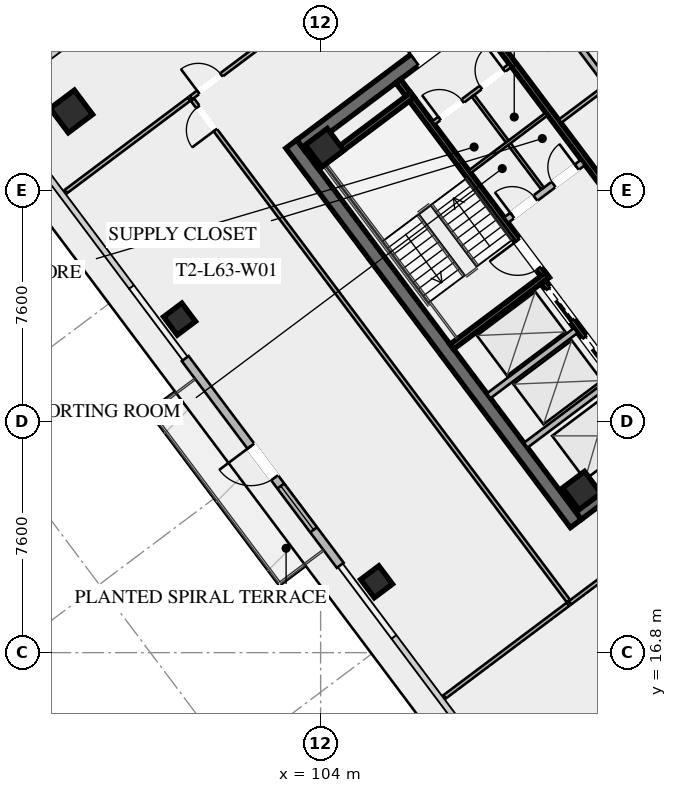
"""IFC4 building model, lengths in metres.
Left out: names, types, materials, properties, quantities, classifications, styles, units other than length and angle.
Written with IfcOpenShell. Run it as: python <this file> out.ifc"""

import sys

from ifc_helpers import new_model, si_unit, direction, frame, frame_2d, origin, origin_2d, place, context, subcontext, project, spatial, rectangle, hollow_rectangle, extrude, element, fill, save


model = new_model("IFC4")
c1 = context("Model", 3, precision=1e-05, world=origin(), true_north=direction((0.0, 1.0)))
c2 = subcontext(c1, "Body", "Model", "MODEL_VIEW")
j1 = project(units=[si_unit("LENGTHUNIT", "METRE"), si_unit("PLANEANGLEUNIT", "RADIAN")], contexts=[c1])
p1 = place(None, origin())
s1 = spatial("IfcSite", under=j1, at=p1, CompositionType="ELEMENT")
p2 = place(p1, origin())
s2 = spatial("IfcBuilding", under=s1, at=p2, CompositionType="ELEMENT")
p3 = place(p2, frame((0.0, 0.0, 232.6)))
s3 = spatial("IfcBuildingStorey", under=s2, at=p3, CompositionType="ELEMENT", Elevation=232.6)
p4 = place(p3, frame((112.396, 21.047, 0.0), z_axis=(0.0, 0.0, 1.0), x_axis=(-0.600005007985, 0.799996243986, 0.0)))
e1 = element("IfcWall", 1, at=p4, inside=s3, PredefinedType="SHEAR", context=c2, shape_type="SweptSolid", body=[
    extrude(rectangle(XDim=15.6, YDim=0.45, at=frame_2d((7.8, 0.0))), origin(), (0.0, 0.0, 1.0), 3.55),
])
p5 = place(p3, frame((124.649, 30.518, 0.0), z_axis=(0.0, 0.0, 1.0), x_axis=(-0.8, -0.6, 0.0)))
e2 = element("IfcWall", 2, at=p5, inside=s3, PredefinedType="SHEAR", context=c2, shape_type="SweptSolid", body=[
    extrude(rectangle(XDim=15.26, YDim=0.45, at=frame_2d((7.63, 0.0))), origin(), (0.0, 0.0, 1.0), 3.55),
])
p6 = place(p5, frame((9.33, 0.0, 0.0)))
e3 = element("IfcOpeningElement", 3, at=p6, cuts=e2, PredefinedType="OPENING", context=c2, shape_type="SweptSolid", body=[
    extrude(rectangle(XDim=1.25, YDim=2.25, at=frame_2d((0.625, 1.125))), frame((0.0, 0.235, 0.0), z_axis=(0.0, -1.0, 0.0), x_axis=(1.0, 0.0, 0.0)), (0.0, 0.0, 1.0), 0.47),
])
p7 = place(p5, frame((4.28, 0.0, 0.0)))
e4 = element("IfcOpeningElement", 4, at=p7, cuts=e2, PredefinedType="OPENING", context=c2, shape_type="SweptSolid", body=[
    extrude(rectangle(XDim=1.25, YDim=2.25, at=frame_2d((0.625, 1.125))), frame((0.0, 0.235, 0.0), z_axis=(0.0, -1.0, 0.0), x_axis=(1.0, 0.0, 0.0)), (0.0, 0.0, 1.0), 0.47),
])
p8 = place(p3, frame((103.351, 33.482, 0.0), z_axis=(0.0, 0.0, 1.0), x_axis=(0.8, 0.6, 0.0)))
e5 = element("IfcWall", 5, at=p8, inside=s3, PredefinedType="SHEAR", context=c2, shape_type="SweptSolid", body=[
    extrude(rectangle(XDim=15.26, YDim=0.45, at=frame_2d((7.63, 0.0))), origin(), (0.0, 0.0, 1.0), 3.55),
])
p9 = place(p8, frame((4.68, 0.0, 0.0)))
e6 = element("IfcOpeningElement", 6, at=p9, cuts=e5, PredefinedType="OPENING", context=c2, shape_type="SweptSolid", body=[
    extrude(rectangle(XDim=1.25, YDim=2.25, at=frame_2d((0.625, 1.125))), frame((0.0, 0.235, 0.0), z_axis=(0.0, -1.0, 0.0), x_axis=(1.0, 0.0, 0.0)), (0.0, 0.0, 1.0), 0.47),
])
p10 = place(p8, frame((9.73, 0.0, 0.0)))
e7 = element("IfcOpeningElement", 7, at=p10, cuts=e5, PredefinedType="OPENING", context=c2, shape_type="SweptSolid", body=[
    extrude(rectangle(XDim=1.25, YDim=2.25, at=frame_2d((0.625, 1.125))), frame((0.0, 0.235, 0.0), z_axis=(0.0, -1.0, 0.0), x_axis=(1.0, 0.0, 0.0)), (0.0, 0.0, 1.0), 0.47),
])
for number, where, z_axis, x_axis in (
    (8, (112.59, 22.13, 0.0), (0.0, 0.0, 1.0), (0.8, 0.6, 0.0)),
    (9, (104.13, 33.41, 0.0), (0.0, 0.0, 1.0), (0.8, 0.6, 0.0)),
):
    element("IfcColumn", number, at=place(p3, frame(where, z_axis=z_axis, x_axis=x_axis)), inside=s3, PredefinedType="COLUMN", context=c2, shape_type="SweptSolid", body=[
        extrude(hollow_rectangle(XDim=0.9, YDim=0.9, WallThickness=0.04, at=origin_2d()), origin(), (0.0, 0.0, 1.0), 3.37),
    ])
p11 = place(p3, frame((95.8, 34.6, -0.175), z_axis=(0.0, 0.0, 1.0), x_axis=(0.799999996291, 0.600000004945, 0.0)))
e10 = element("IfcColumn", 10, at=p11, inside=s3, PredefinedType="COLUMN", context=c2, shape_type="SweptSolid", body=[
    extrude(hollow_rectangle(XDim=1.0, YDim=1.0, WallThickness=0.04, at=origin_2d()), origin(), (0.0, 0.0, 1.0), 3.545),
])
for number, where, z_axis, x_axis in (
    (11, (99.36, 27.77, -0.175), (0.0, 0.0, 1.0), (0.8, 0.6, 0.0)),
    (12, (105.84, 19.13, -0.175), (0.0, 0.0, 1.0), (0.8, 0.6, 0.0)),
):
    element("IfcColumn", number, at=place(p3, frame(where, z_axis=z_axis, x_axis=x_axis)), inside=s3, PredefinedType="COLUMN", context=c2, shape_type="SweptSolid", body=[
        extrude(hollow_rectangle(XDim=0.75, YDim=0.75, WallThickness=0.032, at=origin_2d()), origin(), (0.0, 0.0, 1.0), 3.545),
    ])
p12 = place(p3, frame((104.646, 19.672, 0.0), z_axis=(0.0, 0.0, 1.0), x_axis=(-0.600018382406, 0.799986212866, 0.0)))
e13 = element("IfcWall", 13, at=p12, inside=s3, PredefinedType="SOLIDWALL", context=c2, shape_type="SweptSolid", body=[
    extrude(rectangle(XDim=8.5, YDim=0.28, at=frame_2d((4.25, 0.0))), origin(), (0.0, 0.0, 1.0), 3.37),
])
p13 = place(p12, frame((3.6, 0.0, 0.0)))
e14 = element("IfcOpeningElement", 14, at=p13, cuts=e13, PredefinedType="OPENING", context=c2, shape_type="SweptSolid", body=[
    extrude(rectangle(XDim=1.3, YDim=2.15, at=frame_2d((0.65, 1.075))), frame((0.0, 0.15, 0.0), z_axis=(0.0, -1.0, 0.0), x_axis=(1.0, 0.0, 0.0)), (0.0, 0.0, 1.0), 0.3),
])
p14 = place(p12, frame((1.46, 0.0, 0.85)))
e15 = element("IfcOpeningElement", 15, at=p14, cuts=e13, PredefinedType="OPENING", context=c2, shape_type="SweptSolid", body=[
    extrude(rectangle(XDim=1.8, YDim=1.92, at=frame_2d((0.9, 0.96))), frame((0.0, 0.15, 0.0), z_axis=(0.0, -1.0, 0.0), x_axis=(1.0, 0.0, 0.0)), (0.0, 0.0, 1.0), 0.3),
])
p15 = place(p3, frame((111.44, 29.08, 0.0), z_axis=(0.0, 0.0, 1.0), x_axis=(-0.59999041401, 0.800007189403, 0.0)))
e16 = element("IfcWall", 16, at=p15, inside=s3, PredefinedType="SHEAR", context=c2, shape_type="SweptSolid", body=[
    extrude(rectangle(XDim=8.15, YDim=0.2, at=frame_2d((4.075, 0.0))), origin(), (0.0, 0.0, 1.0), 3.37),
])
p16 = place(p15, frame((0.45, 0.0, 0.0)))
e17 = element("IfcOpeningElement", 17, at=p16, cuts=e16, PredefinedType="OPENING", context=c2, shape_type="SweptSolid", body=[
    extrude(rectangle(XDim=1.15, YDim=2.2, at=frame_2d((0.575, 1.1))), frame((0.0, 0.11, 0.0), z_axis=(0.0, -1.0, 0.0), x_axis=(1.0, 0.0, 0.0)), (0.0, 0.0, 1.0), 0.22),
])
for number, where, z_axis, x_axis in (
    (18, (108.316, 26.862, 0.0), (0.0, 0.0, 1.0), (0.8, 0.6, 0.0)),
    (19, (103.876, 32.782, 0.0), (0.0, 0.0, 1.0), (0.8, 0.6, 0.0)),
):
    element("IfcWall", number, at=place(p3, frame(where, z_axis=z_axis, x_axis=x_axis)), inside=s3, PredefinedType="SHEAR", context=c2, shape_type="SweptSolid", body=[
        extrude(rectangle(XDim=3.93, YDim=0.2, at=frame_2d((1.965, 0.0))), origin(), (0.0, 0.0, 1.0), 3.37),
    ])
p17 = place(p3, frame((118.058, 25.856, 0.0), z_axis=(0.0, 0.0, 1.0), x_axis=(-0.600002657301, 0.799998007018, 0.0)))
e20 = element("IfcWall", 20, at=p17, inside=s3, PredefinedType="SHEAR", context=c2, shape_type="SweptSolid", body=[
    extrude(rectangle(XDim=14.7, YDim=0.2, at=frame_2d((7.35, 0.0))), origin(), (0.0, 0.0, 1.0), 3.37),
])
p18 = place(p3, frame((110.104, 31.028, 0.0), z_axis=(0.0, 0.0, 1.0), x_axis=(0.800018601094, 0.59997519774, 0.0)))
e21 = element("IfcWall", 21, at=p18, inside=s3, PredefinedType="SOLIDWALL", context=c2, shape_type="SweptSolid", body=[
    extrude(rectangle(XDim=3.15, YDim=0.22, at=frame_2d((1.575, 0.0))), origin(), (0.0, 0.0, 1.0), 2.723),
])
p19 = place(p18, frame((0.25, 0.0, 0.0)))
e22 = element("IfcOpeningElement", 22, at=p19, cuts=e21, PredefinedType="OPENING", context=c2, shape_type="SweptSolid", body=[
    extrude(rectangle(XDim=0.95, YDim=2.05, at=frame_2d((0.475, 1.025))), frame((0.0, 0.12, 0.0), z_axis=(0.0, -1.0, 0.0), x_axis=(1.0, 0.0, 0.0)), (0.0, 0.0, 1.0), 0.24),
])
p20 = place(p18, frame((1.95, 0.0, 0.0)))
e23 = element("IfcOpeningElement", 23, at=p20, cuts=e21, PredefinedType="OPENING", context=c2, shape_type="SweptSolid", body=[
    extrude(rectangle(XDim=0.95, YDim=2.05, at=frame_2d((0.475, 1.025))), frame((0.0, 0.12, 0.0), z_axis=(0.0, -1.0, 0.0), x_axis=(1.0, 0.0, 0.0)), (0.0, 0.0, 1.0), 0.24),
])
p21 = place(p3, frame((115.25, 23.75, 0.0), z_axis=(0.0, 0.0, 1.0), x_axis=(-0.599994036198, 0.800004472816, 0.0)))
e24 = element("IfcWall", 24, at=p21, inside=s3, PredefinedType="SHEAR", context=c2, shape_type="SweptSolid", body=[
    extrude(rectangle(XDim=6.55, YDim=0.2, at=frame_2d((3.275, 0.0))), origin(), (0.0, 0.0, 1.0), 3.37),
])
p22 = place(p21, frame((4.975, 0.0, 0.0)))
e25 = element("IfcOpeningElement", 25, at=p22, cuts=e24, PredefinedType="OPENING", context=c2, shape_type="SweptSolid", body=[
    extrude(rectangle(XDim=1.3, YDim=2.25, at=frame_2d((0.65, 1.125))), frame((0.0, 0.11, 0.0), z_axis=(0.0, -1.0, 0.0), x_axis=(1.0, 0.0, 0.0)), (0.0, 0.0, 1.0), 0.22),
])
p23 = place(p21, frame((2.975, 0.0, 0.0)))
e26 = element("IfcOpeningElement", 26, at=p23, cuts=e24, PredefinedType="OPENING", context=c2, shape_type="SweptSolid", body=[
    extrude(rectangle(XDim=1.3, YDim=2.25, at=frame_2d((0.65, 1.125))), frame((0.0, 0.11, 0.0), z_axis=(0.0, -1.0, 0.0), x_axis=(1.0, 0.0, 0.0)), (0.0, 0.0, 1.0), 0.22),
])
p24 = place(p21, frame((0.775, 0.0, 0.0)))
e27 = element("IfcOpeningElement", 27, at=p24, cuts=e24, PredefinedType="OPENING", context=c2, shape_type="SweptSolid", body=[
    extrude(rectangle(XDim=1.3, YDim=2.25, at=frame_2d((0.65, 1.125))), frame((0.0, 0.11, 0.0), z_axis=(0.0, -1.0, 0.0), x_axis=(1.0, 0.0, 0.0)), (0.0, 0.0, 1.0), 0.22),
])
for number, where, z_axis, x_axis in (
    (28, (110.746, 23.622, 0.0), (0.0, 0.0, 1.0), (0.8, 0.6, 0.0)),
    (29, (109.528, 25.246, 0.0), (0.0, 0.0, 1.0), (0.8, 0.6, 0.0)),
):
    element("IfcWall", number, at=place(p3, frame(where, z_axis=z_axis, x_axis=x_axis)), inside=s3, PredefinedType="SOLIDWALL", context=c2, shape_type="SweptSolid", body=[
        extrude(rectangle(XDim=3.58, YDim=0.2, at=frame_2d((1.79, 0.0))), origin(), (0.0, 0.0, 1.0), 3.37),
    ])
p25 = place(p3, frame((112.75, 40.25, 0.0), z_axis=(0.0, 0.0, 1.0), x_axis=(0.599994036198, -0.800004472816, 0.0)))
e30 = element("IfcWall", 30, at=p25, inside=s3, PredefinedType="SHEAR", context=c2, shape_type="SweptSolid", body=[
    extrude(rectangle(XDim=6.55, YDim=0.2, at=frame_2d((3.275, 0.0))), origin(), (0.0, 0.0, 1.0), 3.37),
])
p26 = place(p25, frame((5.075, 0.0, 0.0)))
e31 = element("IfcOpeningElement", 31, at=p26, cuts=e30, PredefinedType="OPENING", context=c2, shape_type="SweptSolid", body=[
    extrude(rectangle(XDim=1.1, YDim=2.2, at=frame_2d((0.55, 1.1))), frame((0.0, 0.11, 0.0), z_axis=(0.0, -1.0, 0.0), x_axis=(1.0, 0.0, 0.0)), (0.0, 0.0, 1.0), 0.22),
])
p27 = place(p25, frame((3.025, 0.0, 0.0)))
e32 = element("IfcOpeningElement", 32, at=p27, cuts=e30, PredefinedType="OPENING", context=c2, shape_type="SweptSolid", body=[
    extrude(rectangle(XDim=1.1, YDim=2.2, at=frame_2d((0.55, 1.1))), frame((0.0, 0.11, 0.0), z_axis=(0.0, -1.0, 0.0), x_axis=(1.0, 0.0, 0.0)), (0.0, 0.0, 1.0), 0.22),
])
p28 = place(p25, frame((1.025, 0.0, 0.0)))
e33 = element("IfcOpeningElement", 33, at=p28, cuts=e30, PredefinedType="OPENING", context=c2, shape_type="SweptSolid", body=[
    extrude(rectangle(XDim=1.1, YDim=2.2, at=frame_2d((0.55, 1.1))), frame((0.0, 0.11, 0.0), z_axis=(0.0, -1.0, 0.0), x_axis=(1.0, 0.0, 0.0)), (0.0, 0.0, 1.0), 0.22),
])
p29 = place(p3, frame((107.71, 34.22, 0.0), z_axis=(0.0, 0.0, 1.0), x_axis=(0.799981399002, 0.60002480053, 0.0)))
e34 = element("IfcWall", 34, at=p29, inside=s3, PredefinedType="PARTITIONING", context=c2, shape_type="SweptSolid", body=[
    extrude(rectangle(XDim=3.15, YDim=0.135, at=frame_2d((1.575, 0.0))), origin(), (0.0, 0.0, 1.0), 2.723),
])
p30 = place(p29, frame((0.25, 0.0, 0.0)))
e35 = element("IfcOpeningElement", 35, at=p30, cuts=e34, PredefinedType="OPENING", context=c2, shape_type="SweptSolid", body=[
    extrude(rectangle(XDim=0.95, YDim=2.05, at=frame_2d((0.475, 1.025))), frame((0.0, 0.077, 0.0), z_axis=(0.0, -1.0, 0.0), x_axis=(1.0, 0.0, 0.0)), (0.0, 0.0, 1.0), 0.155),
])
p31 = place(p29, frame((1.95, 0.0, 0.0)))
e36 = element("IfcOpeningElement", 36, at=p31, cuts=e34, PredefinedType="OPENING", context=c2, shape_type="SweptSolid", body=[
    extrude(rectangle(XDim=0.95, YDim=2.05, at=frame_2d((0.475, 1.025))), frame((0.0, 0.077, 0.0), z_axis=(0.0, -1.0, 0.0), x_axis=(1.0, 0.0, 0.0)), (0.0, 0.0, 1.0), 0.155),
])
p32 = place(p3, frame((111.296, 32.072, 0.0), z_axis=(0.0, 0.0, 1.0), x_axis=(-0.59995887973, 0.800030838552, 0.0)))
e37 = element("IfcWall", 37, at=p32, inside=s3, PredefinedType="PARTITIONING", context=c2, shape_type="SweptSolid", body=[
    extrude(rectangle(XDim=3.8, YDim=0.11, at=frame_2d((1.9, 0.0))), origin(), (0.0, 0.0, 1.0), 2.723),
])
p33 = place(p3, frame((108.91, 32.62, 0.0), z_axis=(0.0, 0.0, 1.0), x_axis=(0.800018601094, 0.59997519774, 0.0)))
e38 = element("IfcWall", 38, at=p33, inside=s3, PredefinedType="PARTITIONING", context=c2, shape_type="SweptSolid", body=[
    extrude(rectangle(XDim=3.15, YDim=0.11, at=frame_2d((1.575, 0.0))), origin(), (0.0, 0.0, 1.0), 2.723),
])
p34 = place(p3, frame((115.11, 33.27, 0.0), z_axis=(0.0, 0.0, 1.0), x_axis=(-0.600011160345, 0.79999162962, 0.0)))
e39 = element("IfcWall", 39, at=p34, inside=s3, PredefinedType="SOLIDWALL", context=c2, shape_type="SweptSolid", body=[
    extrude(rectangle(XDim=7.0, YDim=0.2, at=frame_2d((3.5, 0.0))), origin(), (0.0, 0.0, 1.0), 2.723),
])
p35 = place(p34, frame((0.85, 0.0, 0.0)))
e40 = element("IfcOpeningElement", 40, at=p35, cuts=e39, PredefinedType="OPENING", context=c2, shape_type="SweptSolid", body=[
    extrude(rectangle(XDim=0.95, YDim=2.05, at=frame_2d((0.475, 1.025))), frame((0.0, 0.11, 0.0), z_axis=(0.0, -1.0, 0.0), x_axis=(1.0, 0.0, 0.0)), (0.0, 0.0, 1.0), 0.22),
])
p36 = place(p34, frame((4.85, 0.0, 0.0)))
e41 = element("IfcOpeningElement", 41, at=p36, cuts=e39, PredefinedType="OPENING", context=c2, shape_type="SweptSolid", body=[
    extrude(rectangle(XDim=0.95, YDim=2.05, at=frame_2d((0.475, 1.025))), frame((0.0, 0.11, 0.0), z_axis=(0.0, -1.0, 0.0), x_axis=(1.0, 0.0, 0.0)), (0.0, 0.0, 1.0), 0.22),
])
p37 = place(p3, frame((111.876, 34.282, 0.0), z_axis=(0.0, 0.0, 1.0), x_axis=(0.8, 0.6, 0.0)))
e42 = element("IfcWall", 42, at=p37, inside=s3, PredefinedType="PARTITIONING", context=c2, shape_type="SweptSolid", body=[
    extrude(rectangle(XDim=1.88, YDim=0.135, at=frame_2d((0.94, 0.0))), origin(), (0.0, 0.0, 1.0), 2.723),
])
p38 = place(p3, frame((99.736, 35.052, 0.0), z_axis=(0.0, 0.0, 1.0), x_axis=(0.799997387685, 0.600003483071, 0.0)))
e43 = element("IfcWall", 43, at=p38, inside=s3, PredefinedType="PARTITIONING", context=c2, shape_type="SweptSolid", body=[
    extrude(rectangle(XDim=22.43, YDim=0.135, at=frame_2d((11.215, 0.0))), origin(), (0.0, 0.0, 1.0), 2.723),
])
p39 = place(p38, frame((0.3, 0.0, 0.0)))
e44 = element("IfcOpeningElement", 44, at=p39, cuts=e43, PredefinedType="OPENING", context=c2, shape_type="SweptSolid", body=[
    extrude(rectangle(XDim=0.95, YDim=2.05, at=frame_2d((0.475, 1.025))), frame((0.0, 0.077, 0.0), z_axis=(0.0, -1.0, 0.0), x_axis=(1.0, 0.0, 0.0)), (0.0, 0.0, 1.0), 0.155),
])
p40 = place(p38, frame((9.423, 0.0, 0.0)))
e45 = element("IfcOpeningElement", 45, at=p40, cuts=e43, PredefinedType="OPENING", context=c2, shape_type="SweptSolid", body=[
    extrude(rectangle(XDim=0.95, YDim=2.05, at=frame_2d((0.475, 1.025))), frame((0.0, 0.077, 0.0), z_axis=(0.0, -1.0, 0.0), x_axis=(1.0, 0.0, 0.0)), (0.0, 0.0, 1.0), 0.155),
])
p41 = place(p38, frame((21.18, 0.0, 0.0)))
e46 = element("IfcOpeningElement", 46, at=p41, cuts=e43, PredefinedType="OPENING", context=c2, shape_type="SweptSolid", body=[
    extrude(rectangle(XDim=0.95, YDim=2.05, at=frame_2d((0.475, 1.025))), frame((0.0, 0.077, 0.0), z_axis=(0.0, -1.0, 0.0), x_axis=(1.0, 0.0, 0.0)), (0.0, 0.0, 1.0), 0.155),
])
p42 = place(p3, frame((123.382, 26.824, 0.0), z_axis=(0.0, 0.0, 1.0), x_axis=(-0.800004191227, -0.599994411657, 0.0)))
e47 = element("IfcWall", 47, at=p42, inside=s3, PredefinedType="PARTITIONING", context=c2, shape_type="SweptSolid", body=[
    extrude(rectangle(XDim=13.98, YDim=0.135, at=frame_2d((6.99, 0.0))), origin(), (0.0, 0.0, 1.0), 2.723),
])
p43 = place(p42, frame((7.887, 0.0, 0.0)))
e48 = element("IfcOpeningElement", 48, at=p43, cuts=e47, PredefinedType="OPENING", context=c2, shape_type="SweptSolid", body=[
    extrude(rectangle(XDim=0.95, YDim=2.05, at=frame_2d((0.475, 1.025))), frame((0.0, 0.077, 0.0), z_axis=(0.0, -1.0, 0.0), x_axis=(1.0, 0.0, 0.0)), (0.0, 0.0, 1.0), 0.155),
])
p44 = place(p42, frame((3.67, 0.0, 0.0)))
e49 = element("IfcOpeningElement", 49, at=p44, cuts=e47, PredefinedType="OPENING", context=c2, shape_type="SweptSolid", body=[
    extrude(rectangle(XDim=0.95, YDim=2.05, at=frame_2d((0.475, 1.025))), frame((0.0, 0.077, 0.0), z_axis=(0.0, -1.0, 0.0), x_axis=(1.0, 0.0, 0.0)), (0.0, 0.0, 1.0), 0.155),
])
p45 = place(p3, frame((112.15, 18.5, 0.0), z_axis=(0.0, 0.0, 1.0), x_axis=(-0.599998104681, 0.800001421485, 0.0)))
e50 = element("IfcWall", 50, at=p45, inside=s3, PredefinedType="PARTITIONING", context=c2, shape_type="SweptSolid", body=[
    extrude(rectangle(XDim=20.61, YDim=0.135, at=frame_2d((10.305, 0.0))), origin(), (0.0, 0.0, 1.0), 2.723),
])
p46 = place(p45, frame((19.36, 0.0, 0.0)))
e51 = element("IfcOpeningElement", 51, at=p46, cuts=e50, PredefinedType="OPENING", context=c2, shape_type="SweptSolid", body=[
    extrude(rectangle(XDim=0.95, YDim=2.05, at=frame_2d((0.475, 1.025))), frame((0.0, 0.077, 0.0), z_axis=(0.0, -1.0, 0.0), x_axis=(1.0, 0.0, 0.0)), (0.0, 0.0, 1.0), 0.155),
])
for number, where, z_axis, x_axis in (
    (52, (99.672, 35.004, 0.0), (0.0, 0.0, 1.0), (-0.8, -0.6, 0.0)),
    (53, (108.078, 15.346, 0.0), (0.0, 0.0, 1.0), (0.8, 0.6, 0.0)),
):
    element("IfcWall", number, at=place(p3, frame(where, z_axis=z_axis, x_axis=x_axis)), inside=s3, PredefinedType="PARTITIONING", context=c2, shape_type="SweptSolid", body=[
        extrude(rectangle(XDim=5.07, YDim=0.135, at=frame_2d((2.535, 0.0))), origin(), (0.0, 0.0, 1.0), 2.723),
    ])
p47 = place(p13, origin())
e54 = element("IfcDoor", 54, at=p47, inside=s3, OperationType="SINGLE_SWING_RIGHT", PredefinedType="DOOR", context=c2, shape_type="SweptSolid", body=[
    extrude(rectangle(XDim=1.3, YDim=2.15, at=frame_2d((0.65, 1.075))), frame((0.0, 0.025, 0.0), z_axis=(0.0, -1.0, 0.0), x_axis=(1.0, 0.0, 0.0)), (0.0, 0.0, 1.0), 0.05),
])
fill(e14, e54)
p48 = place(p14, origin())
e55 = element("IfcWindow", 55, at=p48, inside=s3, PartitioningType="SINGLE_PANEL", PredefinedType="WINDOW", context=c2, shape_type="SweptSolid", body=[
    extrude(rectangle(XDim=1.8, YDim=1.92, at=frame_2d((0.9, 0.96))), frame((0.0, 0.03, 0.0), z_axis=(0.0, -1.0, 0.0), x_axis=(1.0, 0.0, 0.0)), (0.0, 0.0, 1.0), 0.06),
])
fill(e15, e55)
p49 = place(p9, origin())
e56 = element("IfcDoor", 56, at=p49, inside=s3, OperationType="SINGLE_SWING_LEFT", PredefinedType="DOOR", context=c2, shape_type="SweptSolid", body=[
    extrude(rectangle(XDim=1.25, YDim=2.25, at=frame_2d((0.625, 1.125))), frame((0.0, 0.025, 0.0), z_axis=(0.0, -1.0, 0.0), x_axis=(1.0, 0.0, 0.0)), (0.0, 0.0, 1.0), 0.05),
])
fill(e6, e56)
p50 = place(p16, origin())
e57 = element("IfcDoor", 57, at=p50, inside=s3, OperationType="SINGLE_SWING_RIGHT", PredefinedType="DOOR", context=c2, shape_type="SweptSolid", body=[
    extrude(rectangle(XDim=1.15, YDim=2.2, at=frame_2d((0.575, 1.1))), frame((0.0, 0.025, 0.0), z_axis=(0.0, -1.0, 0.0), x_axis=(1.0, 0.0, 0.0)), (0.0, 0.0, 1.0), 0.05),
])
fill(e17, e57)
p51 = place(p30, origin())
e58 = element("IfcDoor", 58, at=p51, inside=s3, OperationType="SINGLE_SWING_LEFT", PredefinedType="DOOR", context=c2, shape_type="SweptSolid", body=[
    extrude(rectangle(XDim=0.95, YDim=2.05, at=frame_2d((0.475, 1.025))), frame((0.0, 0.025, 0.0), z_axis=(0.0, -1.0, 0.0), x_axis=(1.0, 0.0, 0.0)), (0.0, 0.0, 1.0), 0.05),
])
fill(e35, e58)
p52 = place(p31, origin())
e59 = element("IfcDoor", 59, at=p52, inside=s3, OperationType="SINGLE_SWING_RIGHT", PredefinedType="DOOR", context=c2, shape_type="SweptSolid", body=[
    extrude(rectangle(XDim=0.95, YDim=2.05, at=frame_2d((0.475, 1.025))), frame((0.0, 0.025, 0.0), z_axis=(0.0, -1.0, 0.0), x_axis=(1.0, 0.0, 0.0)), (0.0, 0.0, 1.0), 0.05),
])
fill(e36, e59)
p53 = place(p19, origin())
e60 = element("IfcDoor", 60, at=p53, inside=s3, OperationType="SINGLE_SWING_LEFT", PredefinedType="DOOR", context=c2, shape_type="SweptSolid", body=[
    extrude(rectangle(XDim=0.95, YDim=2.05, at=frame_2d((0.475, 1.025))), frame((0.0, 0.025, 0.0), z_axis=(0.0, -1.0, 0.0), x_axis=(1.0, 0.0, 0.0)), (0.0, 0.0, 1.0), 0.05),
])
fill(e22, e60)
p54 = place(p20, origin())
e61 = element("IfcDoor", 61, at=p54, inside=s3, OperationType="SINGLE_SWING_RIGHT", PredefinedType="DOOR", context=c2, shape_type="SweptSolid", body=[
    extrude(rectangle(XDim=0.95, YDim=2.05, at=frame_2d((0.475, 1.025))), frame((0.0, 0.025, 0.0), z_axis=(0.0, -1.0, 0.0), x_axis=(1.0, 0.0, 0.0)), (0.0, 0.0, 1.0), 0.05),
])
fill(e23, e61)
p55 = place(p39, origin())
e62 = element("IfcDoor", 62, at=p55, inside=s3, OperationType="SINGLE_SWING_LEFT", PredefinedType="DOOR", context=c2, shape_type="SweptSolid", body=[
    extrude(rectangle(XDim=0.95, YDim=2.05, at=frame_2d((0.475, 1.025))), frame((0.0, 0.025, 0.0), z_axis=(0.0, -1.0, 0.0), x_axis=(1.0, 0.0, 0.0)), (0.0, 0.0, 1.0), 0.05),
])
fill(e44, e62)
p56 = place(p46, origin())
e63 = element("IfcDoor", 63, at=p56, inside=s3, OperationType="SINGLE_SWING_LEFT", PredefinedType="DOOR", context=c2, shape_type="SweptSolid", body=[
    extrude(rectangle(XDim=0.95, YDim=2.05, at=frame_2d((0.475, 1.025))), frame((0.0, 0.025, 0.0), z_axis=(0.0, -1.0, 0.0), x_axis=(1.0, 0.0, 0.0)), (0.0, 0.0, 1.0), 0.05),
])
fill(e51, e63)
p57 = place(p22, origin())
e64 = element("IfcDoor", 64, at=p57, inside=s3, OperationType="SLIDING_TO_LEFT", PredefinedType="DOOR", context=c2, shape_type="SweptSolid", body=[
    extrude(rectangle(XDim=1.3, YDim=2.25, at=frame_2d((0.65, 1.125))), frame((0.0, 0.025, 0.0), z_axis=(0.0, -1.0, 0.0), x_axis=(1.0, 0.0, 0.0)), (0.0, 0.0, 1.0), 0.05),
])
fill(e25, e64)
p58 = place(p23, origin())
e65 = element("IfcDoor", 65, at=p58, inside=s3, OperationType="SLIDING_TO_LEFT", PredefinedType="DOOR", context=c2, shape_type="SweptSolid", body=[
    extrude(rectangle(XDim=1.3, YDim=2.25, at=frame_2d((0.65, 1.125))), frame((0.0, 0.025, 0.0), z_axis=(0.0, -1.0, 0.0), x_axis=(1.0, 0.0, 0.0)), (0.0, 0.0, 1.0), 0.05),
])
fill(e26, e65)
save(model, sys.argv[1])
